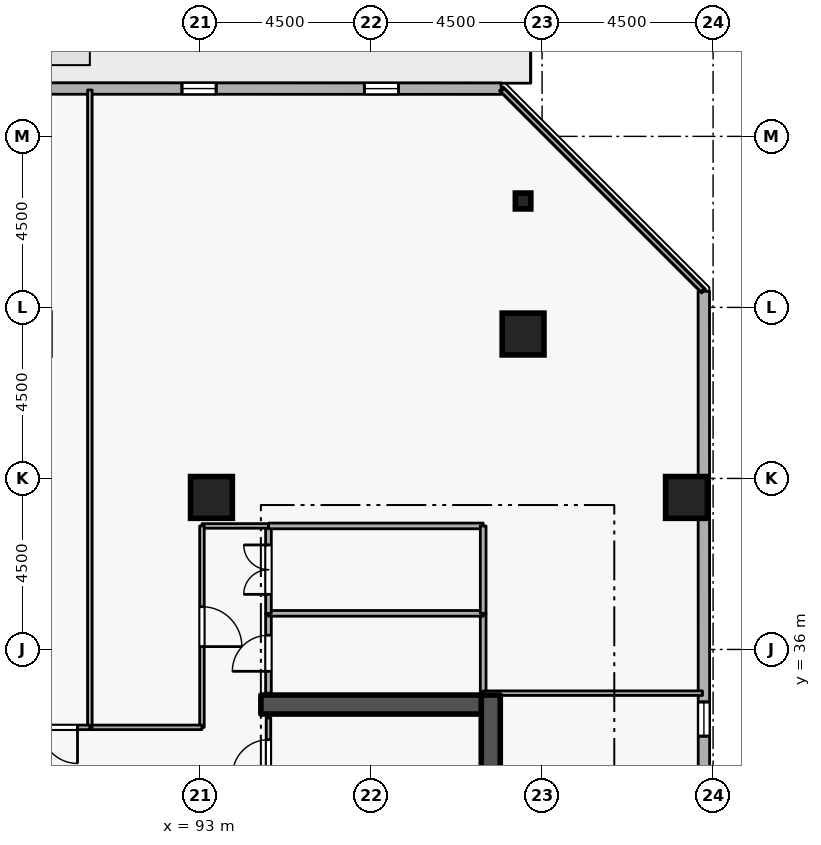
"""IFC4 building model, lengths in metres.
Left out: names, types, materials, properties, quantities, classifications, styles, units other than length and angle.
Written with IfcOpenShell. Run it as: python <this file> out.ifc"""

import sys

from ifc_helpers import new_model, si_unit, direction, frame, frame_2d, origin, origin_2d, place, context, subcontext, project, spatial, rectangle, i_section, extrude, element, fill, save


model = new_model("IFC4")
c1 = context("Model", 3, precision=1e-05, world=origin(), true_north=direction((0.0, 1.0)))
c2 = subcontext(c1, "Body", "Model", "MODEL_VIEW")
j1 = project(units=[si_unit("LENGTHUNIT", "METRE"), si_unit("PLANEANGLEUNIT", "RADIAN")], contexts=[c1])
p1 = place(None, origin())
s1 = spatial("IfcSite", under=j1, at=p1, CompositionType="ELEMENT")
p2 = place(p1, origin())
s2 = spatial("IfcBuilding", under=s1, at=p2, CompositionType="ELEMENT")
p3 = place(p2, frame((0.0, 0.0, 185.7)))
s3 = spatial("IfcBuildingStorey", under=s2, at=p3, CompositionType="ELEMENT", Elevation=185.7)
p4 = place(p3, frame((100.65, 19.2, 0.0), z_axis=(0.0, 0.0, 1.0), x_axis=(0.0, 1.0, 0.0)))
e1 = element("IfcWall", 1, at=p4, inside=s3, PredefinedType="SHEAR", context=c2, shape_type="SweptSolid", body=[
    extrude(rectangle(XDim=15.6, YDim=0.5, at=frame_2d((7.8, 0.0))), origin(), (0.0, 0.0, 1.0), 3.6),
])
p5 = place(p3, frame((94.6, 34.55, 0.0), z_axis=(0.0, 0.0, 1.0), x_axis=(1.0, 0.0, 0.0)))
e2 = element("IfcWall", 2, at=p5, inside=s3, PredefinedType="SHEAR", context=c2, shape_type="SweptSolid", body=[
    extrude(rectangle(XDim=5.8, YDim=0.5, at=frame_2d((2.9, 0.0))), origin(), (0.0, 0.0, 1.0), 3.6),
])
for number, where, z_axis, x_axis in (
    (3, (105.8, 40.0, 0.0), (0.0, 0.0, 1.0), (1.0, 0.0, 0.0)),
    (4, (101.5, 44.3, 0.0), (0.0, 0.0, 1.0), (1.0, 0.0, 0.0)),
    (5, (93.3, 40.0, 0.0), (0.0, 0.0, 1.0), (1.0, 0.0, 0.0)),
):
    element("IfcColumn", number, at=place(p3, frame(where, z_axis=z_axis, x_axis=x_axis)), inside=s3, PredefinedType="COLUMN", context=c2, shape_type="SweptSolid", body=[
        extrude(rectangle(XDim=1.1, YDim=1.1, at=origin_2d()), origin(), (0.0, 0.0, 1.0), 3.6),
    ])
p6 = place(p3, frame((101.5, 47.8, 0.0), z_axis=(0.0, 0.0, 1.0), x_axis=(1.0, 0.0, 0.0)))
e6 = element("IfcColumn", 6, at=p6, inside=s3, PredefinedType="COLUMN", context=c2, shape_type="SweptSolid", body=[
    extrude(i_section(OverallWidth=0.407, OverallDepth=0.419, WebThickness=0.031, FlangeThickness=0.049, FilletRadius=0.015, at=origin_2d()), origin(), (0.0, 0.0, 1.0), 3.6),
])
p7 = place(p3, frame((106.265, 11.819, 0.0), z_axis=(0.0, 0.0, 1.0), x_axis=(-0.000268805477, 0.999999963872, 0.0)))
e7 = element("IfcWall", 7, at=p7, inside=s3, PredefinedType="STANDARD", context=c2, shape_type="SweptSolid", body=[
    extrude(rectangle(XDim=33.605, YDim=0.3, at=frame_2d((16.802, 0.0))), origin(), (0.0, 0.0, 1.0), 2.7),
])
p8 = place(p7, frame((7.5, 0.0, 0.72)))
e8 = element("IfcOpeningElement", 8, at=p8, cuts=e7, PredefinedType="OPENING", context=c2, shape_type="SweptSolid", body=[
    extrude(rectangle(XDim=0.9, YDim=1.75, at=frame_2d((0.45, 0.875))), frame((0.0, 0.16, 0.0), z_axis=(0.0, -1.0, 0.0), x_axis=(1.0, 0.0, 0.0)), (0.0, 0.0, 1.0), 0.32),
])
p9 = place(p7, frame((12.3, 0.0, 0.72)))
e9 = element("IfcOpeningElement", 9, at=p9, cuts=e7, PredefinedType="OPENING", context=c2, shape_type="SweptSolid", body=[
    extrude(rectangle(XDim=0.9, YDim=1.75, at=frame_2d((0.45, 0.875))), frame((0.0, 0.16, 0.0), z_axis=(0.0, -1.0, 0.0), x_axis=(1.0, 0.0, 0.0)), (0.0, 0.0, 1.0), 0.32),
])
p10 = place(p7, frame((17.1, 0.0, 0.72)))
e10 = element("IfcOpeningElement", 10, at=p10, cuts=e7, PredefinedType="OPENING", context=c2, shape_type="SweptSolid", body=[
    extrude(rectangle(XDim=0.9, YDim=1.75, at=frame_2d((0.45, 0.875))), frame((0.0, 0.16, 0.0), z_axis=(0.0, -1.0, 0.0), x_axis=(1.0, 0.0, 0.0)), (0.0, 0.0, 1.0), 0.32),
])
p11 = place(p7, frame((21.9, 0.0, 0.72)))
e11 = element("IfcOpeningElement", 11, at=p11, cuts=e7, PredefinedType="OPENING", context=c2, shape_type="SweptSolid", body=[
    extrude(rectangle(XDim=0.9, YDim=1.75, at=frame_2d((0.45, 0.875))), frame((0.0, 0.16, 0.0), z_axis=(0.0, -1.0, 0.0), x_axis=(1.0, 0.0, 0.0)), (0.0, 0.0, 1.0), 0.32),
])
p12 = place(p3, frame((100.924, 50.756, 0.0), z_axis=(0.0, 0.0, 1.0), x_axis=(-0.999999963872, 0.000268805477, 0.0)))
e12 = element("IfcWall", 12, at=p12, inside=s3, PredefinedType="STANDARD", context=c2, shape_type="SweptSolid", body=[
    extrude(rectangle(XDim=33.605, YDim=0.3, at=frame_2d((16.802, 0.0))), origin(), (0.0, 0.0, 1.0), 2.7),
])
p13 = place(p12, frame((18.603, 0.0, 0.0)))
e13 = element("IfcOpeningElement", 13, at=p13, cuts=e12, PredefinedType="OPENING", context=c2, shape_type="SweptSolid", body=[
    extrude(rectangle(XDim=1.0, YDim=2.08, at=frame_2d((0.5, 1.04))), frame((0.0, 0.16, 0.0), z_axis=(0.0, -1.0, 0.0), x_axis=(1.0, 0.0, 0.0)), (0.0, 0.0, 1.0), 0.32),
])
p14 = place(p12, frame((2.7, 0.0, 0.72)))
e14 = element("IfcOpeningElement", 14, at=p14, cuts=e12, PredefinedType="OPENING", context=c2, shape_type="SweptSolid", body=[
    extrude(rectangle(XDim=0.9, YDim=1.75, at=frame_2d((0.45, 0.875))), frame((0.0, 0.16, 0.0), z_axis=(0.0, -1.0, 0.0), x_axis=(1.0, 0.0, 0.0)), (0.0, 0.0, 1.0), 0.32),
])
p15 = place(p12, frame((7.5, 0.0, 0.72)))
e15 = element("IfcOpeningElement", 15, at=p15, cuts=e12, PredefinedType="OPENING", context=c2, shape_type="SweptSolid", body=[
    extrude(rectangle(XDim=0.9, YDim=1.75, at=frame_2d((0.45, 0.875))), frame((0.0, 0.16, 0.0), z_axis=(0.0, -1.0, 0.0), x_axis=(1.0, 0.0, 0.0)), (0.0, 0.0, 1.0), 0.32),
])
p16 = place(p12, frame((21.9, 0.0, 0.72)))
e16 = element("IfcOpeningElement", 16, at=p16, cuts=e12, PredefinedType="OPENING", context=c2, shape_type="SweptSolid", body=[
    extrude(rectangle(XDim=0.9, YDim=1.75, at=frame_2d((0.45, 0.875))), frame((0.0, 0.16, 0.0), z_axis=(0.0, -1.0, 0.0), x_axis=(1.0, 0.0, 0.0)), (0.0, 0.0, 1.0), 0.32),
])
p17 = place(p12, frame((26.7, 0.0, 0.72)))
e17 = element("IfcOpeningElement", 17, at=p17, cuts=e12, PredefinedType="OPENING", context=c2, shape_type="SweptSolid", body=[
    extrude(rectangle(XDim=0.9, YDim=1.75, at=frame_2d((0.45, 0.875))), frame((0.0, 0.16, 0.0), z_axis=(0.0, -1.0, 0.0), x_axis=(1.0, 0.0, 0.0)), (0.0, 0.0, 1.0), 0.32),
])
p18 = place(p3, frame((94.8, 32.1, 0.0), z_axis=(0.0, 0.0, 1.0), x_axis=(0.0, 1.0, 0.0)))
e18 = element("IfcWall", 18, at=p18, inside=s3, PredefinedType="PARTITIONING", context=c2, shape_type="SweptSolid", body=[
    extrude(rectangle(XDim=2.1, YDim=0.12, at=frame_2d((1.05, 0.0))), origin(), (0.0, 0.0, 1.0), 3.34),
])
p19 = place(p18, frame((0.575, 0.0, 0.0)))
e19 = element("IfcOpeningElement", 19, at=p19, cuts=e18, PredefinedType="OPENING", context=c2, shape_type="SweptSolid", body=[
    extrude(rectangle(XDim=0.95, YDim=2.1, at=frame_2d((0.475, 1.05))), frame((0.0, 0.07, 0.0), z_axis=(0.0, -1.0, 0.0), x_axis=(1.0, 0.0, 0.0)), (0.0, 0.0, 1.0), 0.14),
])
p20 = place(p3, frame((100.45, 36.95, 0.0), z_axis=(0.0, 0.0, 1.0), x_axis=(0.0, -1.0, 0.0)))
e20 = element("IfcWall", 20, at=p20, inside=s3, PredefinedType="PARTITIONING", context=c2, shape_type="SweptSolid", body=[
    extrude(rectangle(XDim=2.1, YDim=0.15, at=frame_2d((1.05, 0.0))), origin(), (0.0, 0.0, 1.0), 3.34),
])
p21 = place(p3, frame((94.8, 34.85, 0.0), z_axis=(0.0, 0.0, 1.0), x_axis=(0.0, 1.0, 0.0)))
e21 = element("IfcWall", 21, at=p21, inside=s3, PredefinedType="PARTITIONING", context=c2, shape_type="SweptSolid", body=[
    extrude(rectangle(XDim=2.1, YDim=0.15, at=frame_2d((1.05, 0.0))), origin(), (0.0, 0.0, 1.0), 3.34),
])
p22 = place(p21, frame((0.575, 0.0, 0.0)))
e22 = element("IfcOpeningElement", 22, at=p22, cuts=e21, PredefinedType="OPENING", context=c2, shape_type="SweptSolid", body=[
    extrude(rectangle(XDim=0.95, YDim=2.1, at=frame_2d((0.475, 1.05))), frame((0.0, 0.085, 0.0), z_axis=(0.0, -1.0, 0.0), x_axis=(1.0, 0.0, 0.0)), (0.0, 0.0, 1.0), 0.17),
])
p23 = place(p3, frame((94.8, 36.95, 0.0), z_axis=(0.0, 0.0, 1.0), x_axis=(1.0, 0.0, 0.0)))
e23 = element("IfcWall", 23, at=p23, inside=s3, PredefinedType="PARTITIONING", context=c2, shape_type="SweptSolid", body=[
    extrude(rectangle(XDim=5.65, YDim=0.15, at=frame_2d((2.825, 0.0))), origin(), (0.0, 0.0, 1.0), 3.34),
])
p24 = place(p3, frame((94.8, 36.95, 0.0), z_axis=(0.0, 0.0, 1.0), x_axis=(0.0, 1.0, 0.0)))
e24 = element("IfcWall", 24, at=p24, inside=s3, PredefinedType="PARTITIONING", context=c2, shape_type="SweptSolid", body=[
    extrude(rectangle(XDim=2.3, YDim=0.15, at=frame_2d((1.15, 0.0))), origin(), (0.0, 0.0, 1.0), 3.34),
])
p25 = place(p24, frame((0.5, 0.0, 0.0)))
e25 = element("IfcOpeningElement", 25, at=p25, cuts=e24, PredefinedType="OPENING", context=c2, shape_type="SweptSolid", body=[
    extrude(rectangle(XDim=1.3, YDim=2.12, at=frame_2d((0.65, 1.06))), frame((0.0, 0.085, 0.0), z_axis=(0.0, -1.0, 0.0), x_axis=(1.0, 0.0, 0.0)), (0.0, 0.0, 1.0), 0.17),
])
p26 = place(p3, frame((94.8, 39.25, 0.0), z_axis=(0.0, 0.0, 1.0), x_axis=(1.0, 0.0, 0.0)))
e26 = element("IfcWall", 26, at=p26, inside=s3, PredefinedType="PARTITIONING", context=c2, shape_type="SweptSolid", body=[
    extrude(rectangle(XDim=5.65, YDim=0.15, at=frame_2d((2.825, 0.0))), origin(), (0.0, 0.0, 1.0), 3.34),
])
p27 = place(p3, frame((100.45, 39.25, 0.0), z_axis=(0.0, 0.0, 1.0), x_axis=(0.0, -1.0, 0.0)))
e27 = element("IfcWall", 27, at=p27, inside=s3, PredefinedType="PARTITIONING", context=c2, shape_type="SweptSolid", body=[
    extrude(rectangle(XDim=2.3, YDim=0.15, at=frame_2d((1.15, 0.0))), origin(), (0.0, 0.0, 1.0), 3.34),
])
p28 = place(p3, frame((94.8, 39.25, 0.0), z_axis=(0.0, 0.0, 1.0), x_axis=(-1.0, 0.0, 0.0)))
e28 = element("IfcWall", 28, at=p28, inside=s3, PredefinedType="PARTITIONING", context=c2, shape_type="SweptSolid", body=[
    extrude(rectangle(XDim=1.75, YDim=0.12, at=frame_2d((0.875, 0.0))), origin(), (0.0, 0.0, 1.0), 3.34),
])
p29 = place(p3, frame((93.05, 39.25, 0.0), z_axis=(0.0, 0.0, 1.0), x_axis=(0.0, -1.0, 0.0)))
e29 = element("IfcWall", 29, at=p29, inside=s3, PredefinedType="PARTITIONING", context=c2, shape_type="SweptSolid", body=[
    extrude(rectangle(XDim=5.3, YDim=0.12, at=frame_2d((2.65, 0.0))), origin(), (0.0, 0.0, 1.0), 3.34),
])
p30 = place(p29, frame((2.125, 0.0, 0.0)))
e30 = element("IfcOpeningElement", 30, at=p30, cuts=e29, PredefinedType="OPENING", context=c2, shape_type="SweptSolid", body=[
    extrude(rectangle(XDim=1.05, YDim=2.1, at=frame_2d((0.525, 1.05))), frame((0.0, 0.07, 0.0), z_axis=(0.0, -1.0, 0.0), x_axis=(1.0, 0.0, 0.0)), (0.0, 0.0, 1.0), 0.14),
])
p31 = place(p3, frame((93.05, 33.95, 0.0), z_axis=(0.0, 0.0, 1.0), x_axis=(-1.0, 0.0, 0.0)))
e31 = element("IfcWall", 31, at=p31, inside=s3, PredefinedType="PARTITIONING", context=c2, shape_type="SweptSolid", body=[
    extrude(rectangle(XDim=2.95, YDim=0.12, at=frame_2d((1.475, 0.0))), origin(), (0.0, 0.0, 1.0), 3.34),
])
p32 = place(p3, frame((90.1, 33.95, 0.0), z_axis=(0.0, 0.0, 1.0), x_axis=(0.0, 1.0, 0.0)))
e32 = element("IfcWall", 32, at=p32, inside=s3, PredefinedType="PARTITIONING", context=c2, shape_type="SweptSolid", body=[
    extrude(rectangle(XDim=16.77, YDim=0.12, at=frame_2d((8.385, 0.0))), origin(), (0.0, 0.0, 1.0), 3.34),
])
p33 = place(p3, frame((100.956, 50.72, 0.0), z_axis=(0.0, 0.0, 1.0), x_axis=(0.707106781187, -0.707106781187, 0.0)))
e33 = element("IfcWall", 33, at=p33, inside=s3, PredefinedType="PARTITIONING", context=c2, shape_type="SweptSolid", body=[
    extrude(rectangle(XDim=7.444, YDim=0.12, at=frame_2d((3.722, 0.0))), origin(), (0.0, 0.0, 1.0), 3.34),
])
p34 = place(p3, frame((106.22, 34.85, 0.0), z_axis=(0.0, 0.0, 1.0), x_axis=(-1.0, 0.0, 0.0)))
e34 = element("IfcWall", 34, at=p34, inside=s3, PredefinedType="PARTITIONING", context=c2, shape_type="SweptSolid", body=[
    extrude(rectangle(XDim=5.77, YDim=0.12, at=frame_2d((2.885, 0.0))), origin(), (0.0, 0.0, 1.0), 2.545),
])
p35 = place(p3, frame((90.1, 33.95, 0.0), z_axis=(0.0, 0.0, 1.0), x_axis=(-1.0, 0.0, 0.0)))
e35 = element("IfcWall", 35, at=p35, inside=s3, PredefinedType="PARTITIONING", context=c2, shape_type="SweptSolid", body=[
    extrude(rectangle(XDim=1.6, YDim=0.12, at=frame_2d((0.8, 0.0))), origin(), (0.0, 0.0, 1.0), 3.34),
])
p36 = place(p35, frame((0.325, 0.0, 0.0)))
e36 = element("IfcOpeningElement", 36, at=p36, cuts=e35, PredefinedType="OPENING", context=c2, shape_type="SweptSolid", body=[
    extrude(rectangle(XDim=0.95, YDim=2.1, at=frame_2d((0.475, 1.05))), frame((0.0, 0.07, 0.0), z_axis=(0.0, -1.0, 0.0), x_axis=(1.0, 0.0, 0.0)), (0.0, 0.0, 1.0), 0.14),
])
p37 = place(p11, origin())
e37 = element("IfcWindow", 37, at=p37, inside=s3, PartitioningType="SINGLE_PANEL", PredefinedType="WINDOW", context=c2, shape_type="SweptSolid", body=[
    extrude(rectangle(XDim=0.9, YDim=1.75, at=frame_2d((0.45, 0.875))), frame((0.0, 0.03, 0.0), z_axis=(0.0, -1.0, 0.0), x_axis=(1.0, 0.0, 0.0)), (0.0, 0.0, 1.0), 0.06),
])
fill(e11, e37)
p38 = place(p14, origin())
e38 = element("IfcWindow", 38, at=p38, inside=s3, PartitioningType="SINGLE_PANEL", PredefinedType="WINDOW", context=c2, shape_type="SweptSolid", body=[
    extrude(rectangle(XDim=0.9, YDim=1.75, at=frame_2d((0.45, 0.875))), frame((0.0, 0.03, 0.0), z_axis=(0.0, -1.0, 0.0), x_axis=(1.0, 0.0, 0.0)), (0.0, 0.0, 1.0), 0.06),
])
fill(e14, e38)
p39 = place(p15, origin())
e39 = element("IfcWindow", 39, at=p39, inside=s3, PartitioningType="SINGLE_PANEL", PredefinedType="WINDOW", context=c2, shape_type="SweptSolid", body=[
    extrude(rectangle(XDim=0.9, YDim=1.75, at=frame_2d((0.45, 0.875))), frame((0.0, 0.03, 0.0), z_axis=(0.0, -1.0, 0.0), x_axis=(1.0, 0.0, 0.0)), (0.0, 0.0, 1.0), 0.06),
])
fill(e15, e39)
p40 = place(p19, origin())
e40 = element("IfcDoor", 40, at=p40, inside=s3, OperationType="SINGLE_SWING_LEFT", PredefinedType="DOOR", context=c2, shape_type="SweptSolid", body=[
    extrude(rectangle(XDim=0.95, YDim=2.1, at=frame_2d((0.475, 1.05))), frame((0.0, 0.025, 0.0), z_axis=(0.0, -1.0, 0.0), x_axis=(1.0, 0.0, 0.0)), (0.0, 0.0, 1.0), 0.05),
])
fill(e19, e40)
p41 = place(p22, origin())
e41 = element("IfcDoor", 41, at=p41, inside=s3, OperationType="SINGLE_SWING_LEFT", PredefinedType="DOOR", context=c2, shape_type="SweptSolid", body=[
    extrude(rectangle(XDim=0.95, YDim=2.1, at=frame_2d((0.475, 1.05))), frame((0.0, 0.025, 0.0), z_axis=(0.0, -1.0, 0.0), x_axis=(1.0, 0.0, 0.0)), (0.0, 0.0, 1.0), 0.05),
])
fill(e22, e41)
p42 = place(p25, origin())
e42 = element("IfcDoor", 42, at=p42, inside=s3, OperationType="DOUBLE_DOOR_SINGLE_SWING", PredefinedType="DOOR", context=c2, shape_type="SweptSolid", body=[
    extrude(rectangle(XDim=1.3, YDim=2.12, at=frame_2d((0.65, 1.06))), frame((0.0, 0.025, 0.0), z_axis=(0.0, -1.0, 0.0), x_axis=(1.0, 0.0, 0.0)), (0.0, 0.0, 1.0), 0.05),
])
fill(e25, e42)
p43 = place(p30, origin())
e43 = element("IfcDoor", 43, at=p43, inside=s3, OperationType="SINGLE_SWING_RIGHT", PredefinedType="DOOR", context=c2, shape_type="SweptSolid", body=[
    extrude(rectangle(XDim=1.05, YDim=2.1, at=frame_2d((0.525, 1.05))), frame((0.0, 0.025, 0.0), z_axis=(0.0, -1.0, 0.0), x_axis=(1.0, 0.0, 0.0)), (0.0, 0.0, 1.0), 0.05),
])
fill(e30, e43)
p44 = place(p36, origin())
e44 = element("IfcDoor", 44, at=p44, inside=s3, OperationType="SINGLE_SWING_LEFT", PredefinedType="DOOR", context=c2, shape_type="SweptSolid", body=[
    extrude(rectangle(XDim=0.95, YDim=2.1, at=frame_2d((0.475, 1.05))), frame((0.0, 0.025, 0.0), z_axis=(0.0, -1.0, 0.0), x_axis=(1.0, 0.0, 0.0)), (0.0, 0.0, 1.0), 0.05),
])
fill(e36, e44)
save(model, sys.argv[1])
